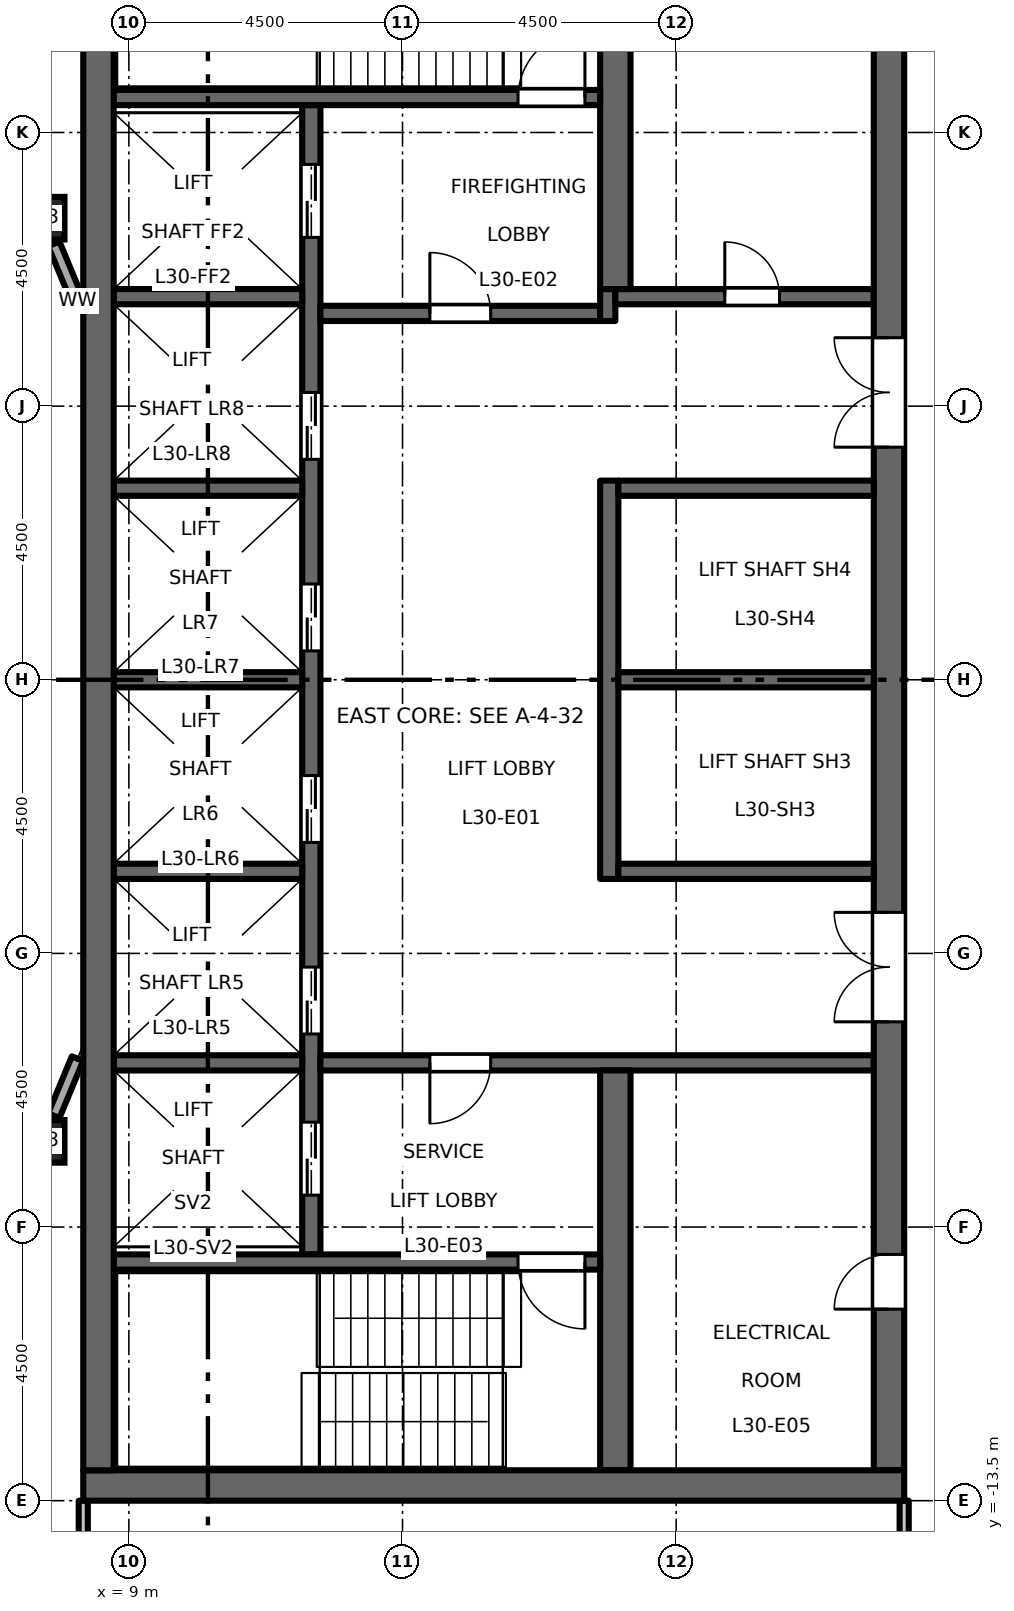
"""IFC4 building model, lengths in metres.
Left out: names, types, materials, properties, quantities, classifications, styles, units other than length and angle.
Written with IfcOpenShell. Run it as: python <this file> out.ifc"""

import sys

from ifc_helpers import new_model, si_unit, direction, frame, frame_2d, origin, origin_2d, place, context, subcontext, project, spatial, rectangle, hollow_rectangle, extrude, element, fill, save


model = new_model("IFC4")
c1 = context("Model", 3, precision=1e-05, world=origin(), true_north=direction((0.0, 1.0)))
c2 = subcontext(c1, "Body", "Model", "MODEL_VIEW")
j1 = project(units=[si_unit("LENGTHUNIT", "METRE"), si_unit("PLANEANGLEUNIT", "RADIAN")], contexts=[c1])
p1 = place(None, origin())
s1 = spatial("IfcSite", under=j1, at=p1, CompositionType="ELEMENT")
p2 = place(p1, origin())
s2 = spatial("IfcBuilding", under=s1, at=p2, CompositionType="ELEMENT")
p3 = place(p2, frame((0.0, 0.0, 140.7)))
s3 = spatial("IfcBuildingStorey", under=s2, at=p3, CompositionType="ELEMENT", Elevation=140.7)
for number, where, z_axis, x_axis in (
    (1, (7.591, -7.591, 0.0), (0.0, 0.0, 1.0), (1.0, 0.0, 0.0)),
    (2, (7.591, 7.591, 0.0), (0.0, 0.0, 1.0), (1.0, 0.0, 0.0)),
):
    element("IfcColumn", number, at=place(p3, frame(where, z_axis=z_axis, x_axis=x_axis)), inside=s3, PredefinedType="COLUMN", context=c2, shape_type="SweptSolid", body=[
        extrude(hollow_rectangle(XDim=0.7, YDim=0.7, WallThickness=0.04, at=origin_2d()), origin(), (0.0, 0.0, 1.0), 4.5),
    ])
p4 = place(p3, frame((12.0, -9.45, 0.0), z_axis=(0.0, 0.0, 1.0), x_axis=(0.0, 1.0, 0.0)))
e3 = element("IfcWall", 3, at=p4, inside=s3, PredefinedType="SHEAR", context=c2, shape_type="SweptSolid", body=[
    extrude(rectangle(XDim=18.9, YDim=0.3, at=frame_2d((9.45, 0.0))), origin(), (0.0, 0.0, 1.0), 4.35),
])
p5 = place(p4, frame((3.625, 0.0, 0.0)))
e4 = element("IfcOpeningElement", 4, at=p5, cuts=e3, PredefinedType="OPENING", context=c2, shape_type="SweptSolid", body=[
    extrude(rectangle(XDim=1.1, YDim=2.1, at=frame_2d((0.55, 1.05))), frame((0.0, 0.16, 0.0), z_axis=(0.0, -1.0, 0.0), x_axis=(1.0, 0.0, 0.0)), (0.0, 0.0, 1.0), 0.32),
])
p6 = place(p4, frame((6.775, 0.0, 0.0)))
e5 = element("IfcOpeningElement", 5, at=p6, cuts=e3, PredefinedType="OPENING", context=c2, shape_type="SweptSolid", body=[
    extrude(rectangle(XDim=1.1, YDim=2.1, at=frame_2d((0.55, 1.05))), frame((0.0, 0.16, 0.0), z_axis=(0.0, -1.0, 0.0), x_axis=(1.0, 0.0, 0.0)), (0.0, 0.0, 1.0), 0.32),
])
p7 = place(p4, frame((9.925, 0.0, 0.0)))
e6 = element("IfcOpeningElement", 6, at=p7, cuts=e3, PredefinedType="OPENING", context=c2, shape_type="SweptSolid", body=[
    extrude(rectangle(XDim=1.1, YDim=2.1, at=frame_2d((0.55, 1.05))), frame((0.0, 0.16, 0.0), z_axis=(0.0, -1.0, 0.0), x_axis=(1.0, 0.0, 0.0)), (0.0, 0.0, 1.0), 0.32),
])
p8 = place(p4, frame((13.075, 0.0, 0.0)))
e7 = element("IfcOpeningElement", 7, at=p8, cuts=e3, PredefinedType="OPENING", context=c2, shape_type="SweptSolid", body=[
    extrude(rectangle(XDim=1.1, YDim=2.1, at=frame_2d((0.55, 1.05))), frame((0.0, 0.16, 0.0), z_axis=(0.0, -1.0, 0.0), x_axis=(1.0, 0.0, 0.0)), (0.0, 0.0, 1.0), 0.32),
])
p9 = place(p4, frame((16.725, 0.0, 0.0)))
e8 = element("IfcOpeningElement", 8, at=p9, cuts=e3, PredefinedType="OPENING", context=c2, shape_type="SweptSolid", body=[
    extrude(rectangle(XDim=1.2, YDim=2.1, at=frame_2d((0.6, 1.05))), frame((0.0, 0.16, 0.0), z_axis=(0.0, -1.0, 0.0), x_axis=(1.0, 0.0, 0.0)), (0.0, 0.0, 1.0), 0.32),
])
p10 = place(p4, frame((0.975, 0.0, 0.0)))
e9 = element("IfcOpeningElement", 9, at=p10, cuts=e3, PredefinedType="OPENING", context=c2, shape_type="SweptSolid", body=[
    extrude(rectangle(XDim=1.2, YDim=2.1, at=frame_2d((0.6, 1.05))), frame((0.0, 0.16, 0.0), z_axis=(0.0, -1.0, 0.0), x_axis=(1.0, 0.0, 0.0)), (0.0, 0.0, 1.0), 0.32),
])
p11 = place(p3, frame((12.15, 6.025, 0.0), z_axis=(0.0, 0.0, 1.0), x_axis=(1.0, 0.0, 0.0)))
e10 = element("IfcWall", 10, at=p11, inside=s3, PredefinedType="SHEAR", context=c2, shape_type="SweptSolid", body=[
    extrude(rectangle(XDim=4.6, YDim=0.25, at=frame_2d((2.3, 0.0))), origin(), (0.0, 0.0, 1.0), 4.35),
])
p12 = place(p11, frame((1.8, 0.0, 0.0)))
e11 = element("IfcOpeningElement", 11, at=p12, cuts=e10, PredefinedType="OPENING", context=c2, shape_type="SweptSolid", body=[
    extrude(rectangle(XDim=1.0, YDim=2.1, at=frame_2d((0.5, 1.05))), frame((0.0, 0.135, 0.0), z_axis=(0.0, -1.0, 0.0), x_axis=(1.0, 0.0, 0.0)), (0.0, 0.0, 1.0), 0.27),
])
p13 = place(p3, frame((16.875, 5.9, 0.0), z_axis=(0.0, 0.0, 1.0), x_axis=(0.0, 1.0, 0.0)))
e12 = element("IfcWall", 12, at=p13, inside=s3, PredefinedType="SHEAR", context=c2, shape_type="SweptSolid", body=[
    extrude(rectangle(XDim=0.525, YDim=0.25, at=frame_2d((0.263, 0.0))), origin(), (0.0, 0.0, 1.0), 4.35),
])
p14 = place(p3, frame((17.0, 6.3, 0.0), z_axis=(0.0, 0.0, 1.0), x_axis=(1.0, 0.0, 0.0)))
e13 = element("IfcWall", 13, at=p14, inside=s3, PredefinedType="SHEAR", context=c2, shape_type="SweptSolid", body=[
    extrude(rectangle(XDim=4.25, YDim=0.25, at=frame_2d((2.125, 0.0))), origin(), (0.0, 0.0, 1.0), 4.35),
])
p15 = place(p14, frame((1.8, 0.0, 0.0)))
e14 = element("IfcOpeningElement", 14, at=p15, cuts=e13, PredefinedType="OPENING", context=c2, shape_type="SweptSolid", body=[
    extrude(rectangle(XDim=0.9, YDim=2.1, at=frame_2d((0.45, 1.05))), frame((0.0, 0.135, 0.0), z_axis=(0.0, -1.0, 0.0), x_axis=(1.0, 0.0, 0.0)), (0.0, 0.0, 1.0), 0.27),
])
p16 = place(p3, frame((12.15, -6.3, 0.0), z_axis=(0.0, 0.0, 1.0), x_axis=(1.0, 0.0, 0.0)))
e15 = element("IfcWall", 15, at=p16, inside=s3, PredefinedType="SHEAR", context=c2, shape_type="SweptSolid", body=[
    extrude(rectangle(XDim=9.1, YDim=0.25, at=frame_2d((4.55, 0.0))), origin(), (0.0, 0.0, 1.0), 4.35),
])
p17 = place(p16, frame((1.8, 0.0, 0.0)))
e16 = element("IfcOpeningElement", 16, at=p17, cuts=e15, PredefinedType="OPENING", context=c2, shape_type="SweptSolid", body=[
    extrude(rectangle(XDim=1.0, YDim=2.1, at=frame_2d((0.5, 1.05))), frame((0.0, 0.135, 0.0), z_axis=(0.0, -1.0, 0.0), x_axis=(1.0, 0.0, 0.0)), (0.0, 0.0, 1.0), 0.27),
])
p18 = place(p3, frame((21.5, -13.0, 0.0), z_axis=(0.0, 0.0, 1.0), x_axis=(0.0, 1.0, 0.0)))
e17 = element("IfcWall", 17, at=p18, inside=s3, PredefinedType="SHEAR", context=c2, shape_type="SweptSolid", body=[
    extrude(rectangle(XDim=26.0, YDim=0.5, at=frame_2d((13.0, 0.0))), origin(), (0.0, 0.0, 1.0), 4.35),
])
p19 = place(p18, frame((16.825, 0.0, 0.0)))
e18 = element("IfcOpeningElement", 18, at=p19, cuts=e17, PredefinedType="OPENING", context=c2, shape_type="SweptSolid", body=[
    extrude(rectangle(XDim=1.8, YDim=2.1, at=frame_2d((0.9, 1.05))), frame((0.0, 0.26, 0.0), z_axis=(0.0, -1.0, 0.0), x_axis=(1.0, 0.0, 0.0)), (0.0, 0.0, 1.0), 0.52),
])
p20 = place(p18, frame((7.375, 0.0, 0.0)))
e19 = element("IfcOpeningElement", 19, at=p20, cuts=e17, PredefinedType="OPENING", context=c2, shape_type="SweptSolid", body=[
    extrude(rectangle(XDim=1.8, YDim=2.1, at=frame_2d((0.9, 1.05))), frame((0.0, 0.26, 0.0), z_axis=(0.0, -1.0, 0.0), x_axis=(1.0, 0.0, 0.0)), (0.0, 0.0, 1.0), 0.52),
])
p21 = place(p18, frame((2.65, 0.0, 0.0)))
e20 = element("IfcOpeningElement", 20, at=p21, cuts=e17, PredefinedType="OPENING", context=c2, shape_type="SweptSolid", body=[
    extrude(rectangle(XDim=0.9, YDim=2.1, at=frame_2d((0.45, 1.05))), frame((0.0, 0.26, 0.0), z_axis=(0.0, -1.0, 0.0), x_axis=(1.0, 0.0, 0.0)), (0.0, 0.0, 1.0), 0.52),
])
p22 = place(p3, frame((16.9, -3.275, 0.0), z_axis=(0.0, 0.0, 1.0), x_axis=(0.0, 1.0, 0.0)))
e21 = element("IfcWall", 21, at=p22, inside=s3, PredefinedType="SHEAR", context=c2, shape_type="SweptSolid", body=[
    extrude(rectangle(XDim=6.55, YDim=0.3, at=frame_2d((3.275, 0.0))), origin(), (0.0, 0.0, 1.0), 4.35),
])
for number, where, z_axis, x_axis in (
    (22, (17.05, 0.0, 0.0), (0.0, 0.0, 1.0), (1.0, 0.0, 0.0)),
    (23, (17.05, 3.15, 0.0), (0.0, 0.0, 1.0), (1.0, 0.0, 0.0)),
    (24, (17.05, -3.15, 0.0), (0.0, 0.0, 1.0), (1.0, 0.0, 0.0)),
):
    element("IfcWall", number, at=place(p3, frame(where, z_axis=z_axis, x_axis=x_axis)), inside=s3, PredefinedType="SHEAR", context=c2, shape_type="SweptSolid", body=[
        extrude(rectangle(XDim=4.2, YDim=0.25, at=frame_2d((2.1, 0.0))), origin(), (0.0, 0.0, 1.0), 4.35),
    ])
for number, where, z_axis, x_axis in (
    (25, (17.0, 6.425, 0.0), (0.0, 0.0, 1.0), (0.0, 1.0, 0.0)),
    (26, (17.0, -13.0, 0.0), (0.0, 0.0, 1.0), (0.0, 1.0, 0.0)),
):
    element("IfcWall", number, at=place(p3, frame(where, z_axis=z_axis, x_axis=x_axis)), inside=s3, PredefinedType="SHEAR", context=c2, shape_type="SweptSolid", body=[
        extrude(rectangle(XDim=6.575, YDim=0.5, at=frame_2d((3.288, 0.0))), origin(), (0.0, 0.0, 1.0), 4.35),
    ])
for number, where, z_axis, x_axis in (
    (27, (8.75, 0.0, 0.0), (0.0, 0.0, 1.0), (1.0, 0.0, 0.0)),
    (28, (8.75, 3.15, 0.0), (0.0, 0.0, 1.0), (1.0, 0.0, 0.0)),
    (29, (8.75, 6.3, 0.0), (0.0, 0.0, 1.0), (1.0, 0.0, 0.0)),
    (30, (8.75, -3.15, 0.0), (0.0, 0.0, 1.0), (1.0, 0.0, 0.0)),
    (31, (8.75, -6.3, 0.0), (0.0, 0.0, 1.0), (1.0, 0.0, 0.0)),
):
    element("IfcWall", number, at=place(p3, frame(where, z_axis=z_axis, x_axis=x_axis)), inside=s3, PredefinedType="SHEAR", context=c2, shape_type="SweptSolid", body=[
        extrude(rectangle(XDim=3.1, YDim=0.25, at=frame_2d((1.55, 0.0))), origin(), (0.0, 0.0, 1.0), 4.35),
    ])
p23 = place(p3, frame((8.75, 9.575, 0.0), z_axis=(0.0, 0.0, 1.0), x_axis=(1.0, 0.0, 0.0)))
e32 = element("IfcWall", 32, at=p23, inside=s3, PredefinedType="SHEAR", context=c2, shape_type="SweptSolid", body=[
    extrude(rectangle(XDim=8.0, YDim=0.25, at=frame_2d((4.0, 0.0))), origin(), (0.0, 0.0, 1.0), 4.35),
])
p24 = place(p23, frame((6.65, 0.0, 0.0)))
e33 = element("IfcOpeningElement", 33, at=p24, cuts=e32, PredefinedType="OPENING", context=c2, shape_type="SweptSolid", body=[
    extrude(rectangle(XDim=1.1, YDim=2.1, at=frame_2d((0.55, 1.05))), frame((0.0, 0.135, 0.0), z_axis=(0.0, -1.0, 0.0), x_axis=(1.0, 0.0, 0.0)), (0.0, 0.0, 1.0), 0.27),
])
p25 = place(p3, frame((8.75, -9.575, 0.0), z_axis=(0.0, 0.0, 1.0), x_axis=(1.0, 0.0, 0.0)))
e34 = element("IfcWall", 34, at=p25, inside=s3, PredefinedType="SHEAR", context=c2, shape_type="SweptSolid", body=[
    extrude(rectangle(XDim=8.0, YDim=0.25, at=frame_2d((4.0, 0.0))), origin(), (0.0, 0.0, 1.0), 4.35),
])
p26 = place(p25, frame((6.65, 0.0, 0.0)))
e35 = element("IfcOpeningElement", 35, at=p26, cuts=e34, PredefinedType="OPENING", context=c2, shape_type="SweptSolid", body=[
    extrude(rectangle(XDim=1.1, YDim=2.1, at=frame_2d((0.55, 1.05))), frame((0.0, 0.135, 0.0), z_axis=(0.0, -1.0, 0.0), x_axis=(1.0, 0.0, 0.0)), (0.0, 0.0, 1.0), 0.27),
])
p27 = place(p3, frame((8.25, -13.25, 0.0), z_axis=(0.0, 0.0, 1.0), x_axis=(1.0, 0.0, 0.0)))
e36 = element("IfcWall", 36, at=p27, inside=s3, PredefinedType="SHEAR", context=c2, shape_type="SweptSolid", body=[
    extrude(rectangle(XDim=13.5, YDim=0.5, at=frame_2d((6.75, 0.0))), origin(), (0.0, 0.0, 1.0), 4.35),
])
p28 = place(p3, frame((8.5, -13.0, 0.0), z_axis=(0.0, 0.0, 1.0), x_axis=(0.0, 1.0, 0.0)))
e37 = element("IfcWall", 37, at=p28, inside=s3, PredefinedType="SHEAR", context=c2, shape_type="SweptSolid", body=[
    extrude(rectangle(XDim=26.0, YDim=0.5, at=frame_2d((13.0, 0.0))), origin(), (0.0, 0.0, 1.0), 4.35),
])
for number, where, z_axis, x_axis in (
    (38, (7.766, -7.168, 0.0), (0.0, 0.0, 1.0), (0.383, 0.924, 0.0)),
    (39, (8.154, 6.231, 0.0), (0.0, 0.0, 1.0), (-0.383, 0.924, 0.0)),
):
    element("IfcWall", number, at=place(p3, frame(where, z_axis=z_axis, x_axis=x_axis)), inside=s3, PredefinedType="STANDARD", context=c2, shape_type="SweptSolid", body=[
        extrude(rectangle(XDim=1.015, YDim=0.2, at=frame_2d((0.507, 0.0))), origin(), (0.0, 0.0, 1.0), 3.826),
    ])
p29 = place(p3, frame((8.25, -16.8, 0.0), z_axis=(0.0, 0.0, 1.0), x_axis=(0.0, 1.0, 0.0)))
e40 = element("IfcWall", 40, at=p29, inside=s3, PredefinedType="PARTITIONING", context=c2, shape_type="SweptSolid", body=[
    extrude(rectangle(XDim=3.3, YDim=0.15, at=frame_2d((1.65, 0.0))), origin(), (0.0, 0.0, 1.0), 4.35),
])
p30 = place(p3, frame((21.75, -18.925, 0.0), z_axis=(0.0, 0.0, 1.0), x_axis=(0.0, 1.0, 0.0)))
e41 = element("IfcWall", 41, at=p30, inside=s3, PredefinedType="PARTITIONING", context=c2, shape_type="SweptSolid", body=[
    extrude(rectangle(XDim=5.425, YDim=0.15, at=frame_2d((2.712, 0.0))), origin(), (0.0, 0.0, 1.0), 4.35),
])
p31 = place(p12, origin())
e42 = element("IfcDoor", 42, at=p31, inside=s3, OperationType="SINGLE_SWING_RIGHT", PredefinedType="DOOR", context=c2, shape_type="SweptSolid", body=[
    extrude(rectangle(XDim=1.0, YDim=2.1, at=frame_2d((0.5, 1.05))), frame((0.0, 0.025, 0.0), z_axis=(0.0, -1.0, 0.0), x_axis=(1.0, 0.0, 0.0)), (0.0, 0.0, 1.0), 0.05),
])
fill(e11, e42)
p32 = place(p17, origin())
e43 = element("IfcDoor", 43, at=p32, inside=s3, OperationType="SINGLE_SWING_LEFT", PredefinedType="DOOR", context=c2, shape_type="SweptSolid", body=[
    extrude(rectangle(XDim=1.0, YDim=2.1, at=frame_2d((0.5, 1.05))), frame((0.0, 0.025, 0.0), z_axis=(0.0, -1.0, 0.0), x_axis=(1.0, 0.0, 0.0)), (0.0, 0.0, 1.0), 0.05),
])
fill(e16, e43)
p33 = place(p24, origin())
e44 = element("IfcDoor", 44, at=p33, inside=s3, OperationType="SINGLE_SWING_LEFT", PredefinedType="DOOR", context=c2, shape_type="SweptSolid", body=[
    extrude(rectangle(XDim=1.1, YDim=2.1, at=frame_2d((0.55, 1.05))), frame((0.0, 0.025, 0.0), z_axis=(0.0, -1.0, 0.0), x_axis=(1.0, 0.0, 0.0)), (0.0, 0.0, 1.0), 0.05),
])
fill(e33, e44)
p34 = place(p26, origin())
e45 = element("IfcDoor", 45, at=p34, inside=s3, OperationType="SINGLE_SWING_RIGHT", PredefinedType="DOOR", context=c2, shape_type="SweptSolid", body=[
    extrude(rectangle(XDim=1.1, YDim=2.1, at=frame_2d((0.55, 1.05))), frame((0.0, 0.025, 0.0), z_axis=(0.0, -1.0, 0.0), x_axis=(1.0, 0.0, 0.0)), (0.0, 0.0, 1.0), 0.05),
])
fill(e35, e45)
p35 = place(p19, origin())
e46 = element("IfcDoor", 46, at=p35, inside=s3, OperationType="DOUBLE_DOOR_DOUBLE_SWING", PredefinedType="DOOR", context=c2, shape_type="SweptSolid", body=[
    extrude(rectangle(XDim=1.8, YDim=2.1, at=frame_2d((0.9, 1.05))), frame((0.0, 0.025, 0.0), z_axis=(0.0, -1.0, 0.0), x_axis=(1.0, 0.0, 0.0)), (0.0, 0.0, 1.0), 0.05),
])
fill(e18, e46)
p36 = place(p20, origin())
e47 = element("IfcDoor", 47, at=p36, inside=s3, OperationType="DOUBLE_DOOR_DOUBLE_SWING", PredefinedType="DOOR", context=c2, shape_type="SweptSolid", body=[
    extrude(rectangle(XDim=1.8, YDim=2.1, at=frame_2d((0.9, 1.05))), frame((0.0, 0.025, 0.0), z_axis=(0.0, -1.0, 0.0), x_axis=(1.0, 0.0, 0.0)), (0.0, 0.0, 1.0), 0.05),
])
fill(e19, e47)
p37 = place(p5, origin())
e48 = element("IfcDoor", 48, at=p37, inside=s3, OperationType="DOUBLE_DOOR_SLIDING", PredefinedType="DOOR", context=c2, shape_type="SweptSolid", body=[
    extrude(rectangle(XDim=1.1, YDim=2.1, at=frame_2d((0.55, 1.05))), frame((0.0, 0.025, 0.0), z_axis=(0.0, -1.0, 0.0), x_axis=(1.0, 0.0, 0.0)), (0.0, 0.0, 1.0), 0.05),
])
fill(e4, e48)
p38 = place(p6, origin())
e49 = element("IfcDoor", 49, at=p38, inside=s3, OperationType="DOUBLE_DOOR_SLIDING", PredefinedType="DOOR", context=c2, shape_type="SweptSolid", body=[
    extrude(rectangle(XDim=1.1, YDim=2.1, at=frame_2d((0.55, 1.05))), frame((0.0, 0.025, 0.0), z_axis=(0.0, -1.0, 0.0), x_axis=(1.0, 0.0, 0.0)), (0.0, 0.0, 1.0), 0.05),
])
fill(e5, e49)
p39 = place(p7, origin())
e50 = element("IfcDoor", 50, at=p39, inside=s3, OperationType="DOUBLE_DOOR_SLIDING", PredefinedType="DOOR", context=c2, shape_type="SweptSolid", body=[
    extrude(rectangle(XDim=1.1, YDim=2.1, at=frame_2d((0.55, 1.05))), frame((0.0, 0.025, 0.0), z_axis=(0.0, -1.0, 0.0), x_axis=(1.0, 0.0, 0.0)), (0.0, 0.0, 1.0), 0.05),
])
fill(e6, e50)
p40 = place(p8, origin())
e51 = element("IfcDoor", 51, at=p40, inside=s3, OperationType="DOUBLE_DOOR_SLIDING", PredefinedType="DOOR", context=c2, shape_type="SweptSolid", body=[
    extrude(rectangle(XDim=1.1, YDim=2.1, at=frame_2d((0.55, 1.05))), frame((0.0, 0.025, 0.0), z_axis=(0.0, -1.0, 0.0), x_axis=(1.0, 0.0, 0.0)), (0.0, 0.0, 1.0), 0.05),
])
fill(e7, e51)
p41 = place(p9, origin())
e52 = element("IfcDoor", 52, at=p41, inside=s3, OperationType="DOUBLE_DOOR_SLIDING", PredefinedType="DOOR", context=c2, shape_type="SweptSolid", body=[
    extrude(rectangle(XDim=1.2, YDim=2.1, at=frame_2d((0.6, 1.05))), frame((0.0, 0.025, 0.0), z_axis=(0.0, -1.0, 0.0), x_axis=(1.0, 0.0, 0.0)), (0.0, 0.0, 1.0), 0.05),
])
fill(e8, e52)
p42 = place(p10, origin())
e53 = element("IfcDoor", 53, at=p42, inside=s3, OperationType="DOUBLE_DOOR_SLIDING", PredefinedType="DOOR", context=c2, shape_type="SweptSolid", body=[
    extrude(rectangle(XDim=1.2, YDim=2.1, at=frame_2d((0.6, 1.05))), frame((0.0, 0.025, 0.0), z_axis=(0.0, -1.0, 0.0), x_axis=(1.0, 0.0, 0.0)), (0.0, 0.0, 1.0), 0.05),
])
fill(e9, e53)
p43 = place(p15, origin())
e54 = element("IfcDoor", 54, at=p43, inside=s3, OperationType="SINGLE_SWING_RIGHT", PredefinedType="DOOR", context=c2, shape_type="SweptSolid", body=[
    extrude(rectangle(XDim=0.9, YDim=2.1, at=frame_2d((0.45, 1.05))), frame((0.0, 0.025, 0.0), z_axis=(0.0, -1.0, 0.0), x_axis=(1.0, 0.0, 0.0)), (0.0, 0.0, 1.0), 0.05),
])
fill(e14, e54)
p44 = place(p21, origin())
e55 = element("IfcDoor", 55, at=p44, inside=s3, OperationType="SINGLE_SWING_RIGHT", PredefinedType="DOOR", context=c2, shape_type="SweptSolid", body=[
    extrude(rectangle(XDim=0.9, YDim=2.1, at=frame_2d((0.45, 1.05))), frame((0.0, 0.025, 0.0), z_axis=(0.0, -1.0, 0.0), x_axis=(1.0, 0.0, 0.0)), (0.0, 0.0, 1.0), 0.05),
])
fill(e20, e55)
save(model, sys.argv[1])
